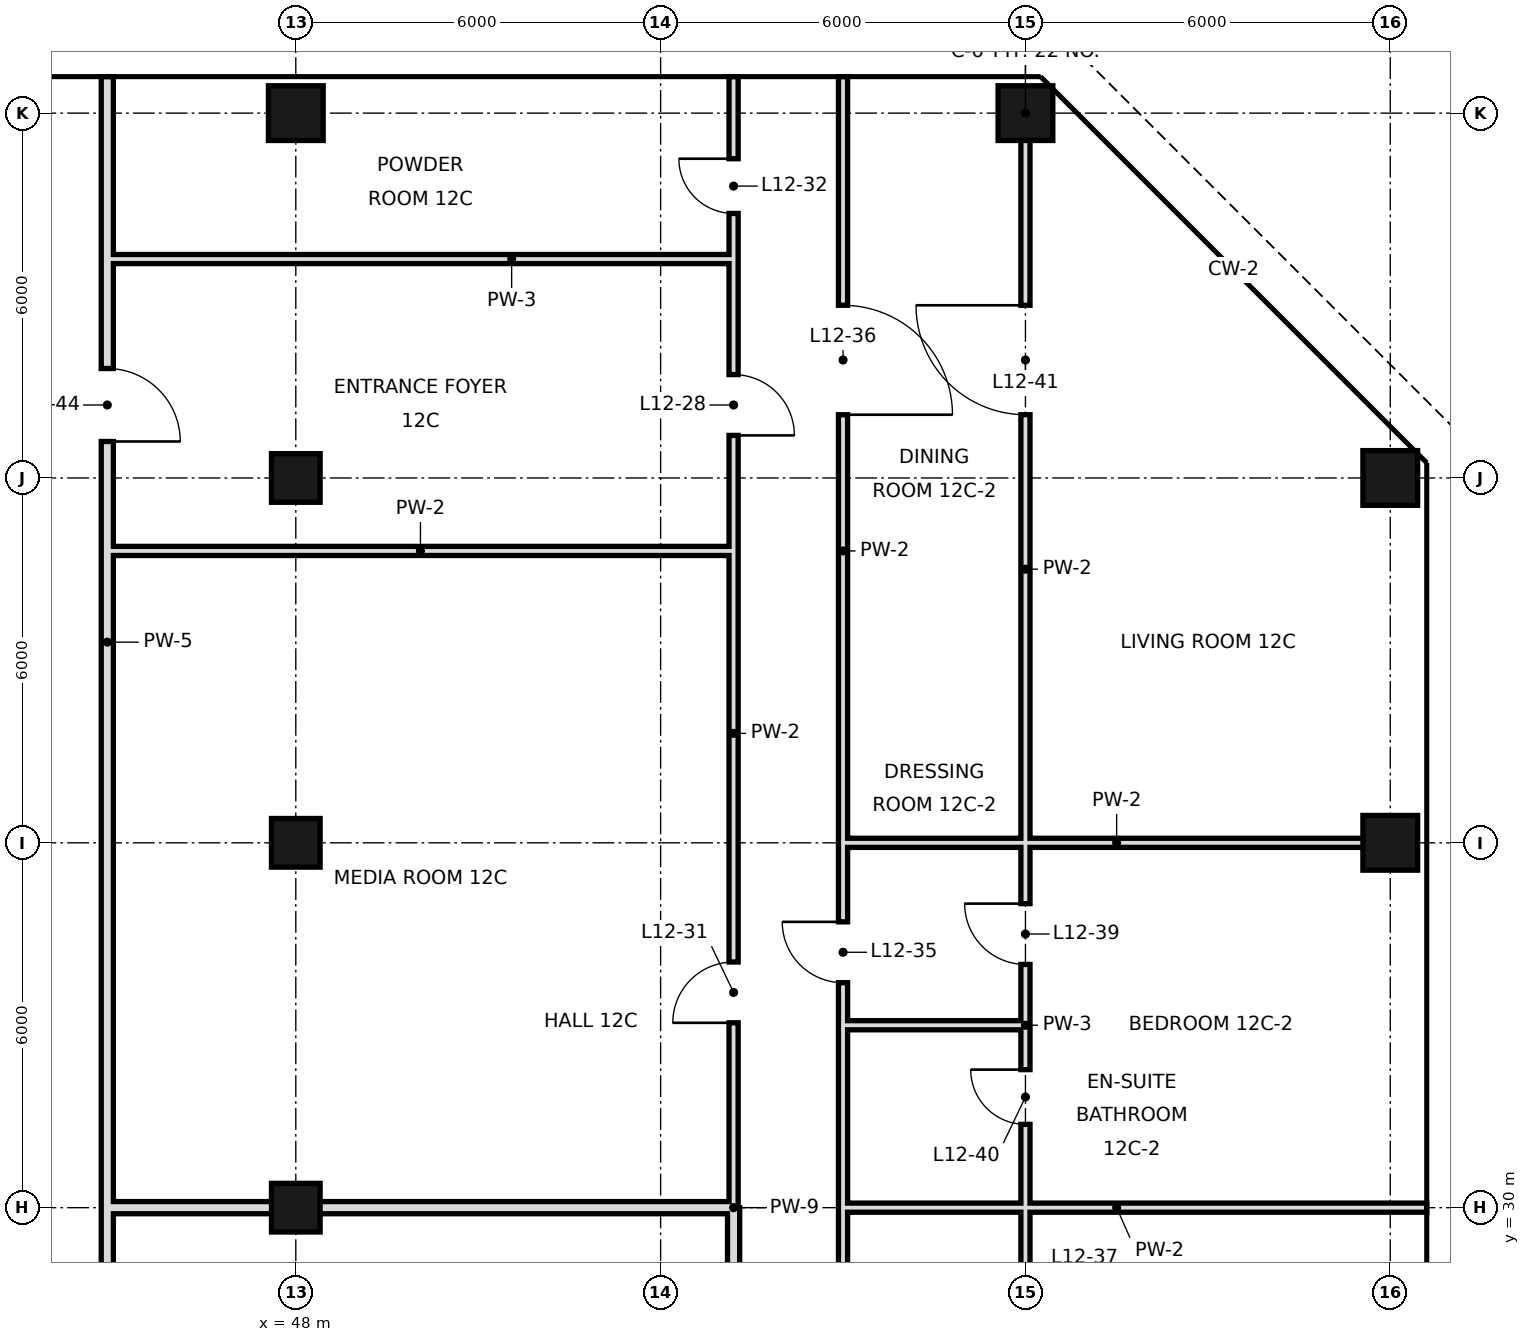
"""IFC4 building model, lengths in metres.
Left out: names, types, materials, properties, quantities, classifications, styles, units other than length and angle.
Written with IfcOpenShell. Run it as: python <this file> out.ifc"""

import sys

from ifc_helpers import new_model, si_unit, direction, frame, frame_2d, origin, origin_2d, place, context, subcontext, project, spatial, rectangle, hollow_rectangle, extrude, element, fill, save


model = new_model("IFC4")
c1 = context("Model", 3, precision=1e-05, world=origin(), true_north=direction((0.0, 1.0)))
c2 = subcontext(c1, "Body", "Model", "MODEL_VIEW")
j1 = project(units=[si_unit("LENGTHUNIT", "METRE"), si_unit("PLANEANGLEUNIT", "RADIAN")], contexts=[c1])
p1 = place(None, origin())
s1 = spatial("IfcSite", under=j1, at=p1, CompositionType="ELEMENT")
p2 = place(p1, origin())
s2 = spatial("IfcBuilding", under=s1, at=p2, CompositionType="ELEMENT")
p3 = place(p2, frame((0.0, 0.0, 64.2)))
s3 = spatial("IfcBuildingStorey", under=s2, at=p3, CompositionType="ELEMENT", Elevation=64.2)
for number, where, z_axis, x_axis in (
    (1, (48.0, 30.0, 0.0), (0.0, 0.0, 1.0), (1.0, 0.0, 0.0)),
    (2, (48.0, 36.0, 0.0), (0.0, 0.0, 1.0), (1.0, 0.0, 0.0)),
    (3, (48.0, 42.0, 0.0), (0.0, 0.0, 1.0), (1.0, 0.0, 0.0)),
):
    element("IfcColumn", number, at=place(p3, frame(where, z_axis=z_axis, x_axis=x_axis)), inside=s3, PredefinedType="COLUMN", context=c2, shape_type="SweptSolid", body=[
        extrude(hollow_rectangle(XDim=0.8, YDim=0.8, WallThickness=0.04, at=origin_2d()), origin(), (0.0, 0.0, 1.0), 3.6),
    ])
for number, where, z_axis, x_axis in (
    (4, (48.0, 48.0, 0.0), (0.0, 0.0, 1.0), (1.0, 0.0, 0.0)),
    (5, (60.0, 48.0, 0.0), (0.0, 0.0, 1.0), (1.0, 0.0, 0.0)),
    (6, (66.0, 36.0, 0.0), (0.0, 0.0, 1.0), (1.0, 0.0, 0.0)),
    (7, (66.0, 42.0, 0.0), (0.0, 0.0, 1.0), (1.0, 0.0, 0.0)),
):
    element("IfcColumn", number, at=place(p3, frame(where, z_axis=z_axis, x_axis=x_axis)), inside=s3, PredefinedType="COLUMN", context=c2, shape_type="SweptSolid", body=[
        extrude(hollow_rectangle(XDim=0.9, YDim=0.9, WallThickness=0.045, at=origin_2d()), origin(), (0.0, 0.0, 1.0), 3.6),
    ])
p4 = place(p3, frame((44.9, 30.0, 0.0), z_axis=(0.0, 0.0, 1.0), x_axis=(0.0, 1.0, 0.0)))
e8 = element("IfcWall", 8, at=p4, inside=s3, PredefinedType="SOLIDWALL", context=c2, shape_type="SweptSolid", body=[
    extrude(rectangle(XDim=18.6, YDim=0.2, at=frame_2d((9.3, 0.0))), origin(), (0.0, 0.0, 1.0), 2.72),
])
p5 = place(p4, frame((12.6, 0.0, 0.0)))
e9 = element("IfcOpeningElement", 9, at=p5, cuts=e8, PredefinedType="OPENING", context=c2, shape_type="SweptSolid", body=[
    extrude(rectangle(XDim=1.2, YDim=2.4, at=frame_2d((0.6, 1.2))), frame((0.0, 0.11, 0.0), z_axis=(0.0, -1.0, 0.0), x_axis=(1.0, 0.0, 0.0)), (0.0, 0.0, 1.0), 0.22),
])
p6 = place(p3, frame((44.9, 25.8, 0.0), z_axis=(0.0, 0.0, 1.0), x_axis=(0.0, 1.0, 0.0)))
e10 = element("IfcWall", 10, at=p6, inside=s3, PredefinedType="SOLIDWALL", context=c2, shape_type="SweptSolid", body=[
    extrude(rectangle(XDim=4.2, YDim=0.2, at=frame_2d((2.1, 0.0))), origin(), (0.0, 0.0, 1.0), 2.97),
])
p7 = place(p3, frame((55.2, 25.8, 0.0), z_axis=(0.0, 0.0, 1.0), x_axis=(0.0, 1.0, 0.0)))
e11 = element("IfcWall", 11, at=p7, inside=s3, PredefinedType="SOLIDWALL", context=c2, shape_type="SweptSolid", body=[
    extrude(rectangle(XDim=4.2, YDim=0.2, at=frame_2d((2.1, 0.0))), origin(), (0.0, 0.0, 1.0), 2.52),
])
p8 = place(p7, frame((1.6, 0.0, 0.0)))
e12 = element("IfcOpeningElement", 12, at=p8, cuts=e11, PredefinedType="OPENING", context=c2, shape_type="SweptSolid", body=[
    extrude(rectangle(XDim=1.0, YDim=2.4, at=frame_2d((0.5, 1.2))), frame((0.0, 0.11, 0.0), z_axis=(0.0, -1.0, 0.0), x_axis=(1.0, 0.0, 0.0)), (0.0, 0.0, 1.0), 0.22),
])
p9 = place(p3, frame((55.2, 30.0, 0.0), z_axis=(0.0, 0.0, 1.0), x_axis=(0.0, 1.0, 0.0)))
e13 = element("IfcWall", 13, at=p9, inside=s3, PredefinedType="PARTITIONING", context=c2, shape_type="SweptSolid", body=[
    extrude(rectangle(XDim=15.6, YDim=0.15, at=frame_2d((7.8, 0.0))), origin(), (0.0, 0.0, 1.0), 3.42),
])
p10 = place(p9, frame((12.7, 0.0, 0.0)))
e14 = element("IfcOpeningElement", 14, at=p10, cuts=e13, PredefinedType="OPENING", context=c2, shape_type="SweptSolid", body=[
    extrude(rectangle(XDim=1.0, YDim=2.4, at=frame_2d((0.5, 1.2))), frame((0.0, 0.085, 0.0), z_axis=(0.0, -1.0, 0.0), x_axis=(1.0, 0.0, 0.0)), (0.0, 0.0, 1.0), 0.17),
])
p11 = place(p9, frame((3.04, 0.0, 0.0)))
e15 = element("IfcOpeningElement", 15, at=p11, cuts=e13, PredefinedType="OPENING", context=c2, shape_type="SweptSolid", body=[
    extrude(rectangle(XDim=1.0, YDim=2.4, at=frame_2d((0.5, 1.2))), frame((0.0, 0.085, 0.0), z_axis=(0.0, -1.0, 0.0), x_axis=(1.0, 0.0, 0.0)), (0.0, 0.0, 1.0), 0.17),
])
p12 = place(p3, frame((55.2, 45.6, 0.0), z_axis=(0.0, 0.0, 1.0), x_axis=(0.0, 1.0, 0.0)))
e16 = element("IfcWall", 16, at=p12, inside=s3, PredefinedType="PARTITIONING", context=c2, shape_type="SweptSolid", body=[
    extrude(rectangle(XDim=3.0, YDim=0.15, at=frame_2d((1.5, 0.0))), origin(), (0.0, 0.0, 1.0), 3.42),
])
p13 = place(p12, frame((0.75, 0.0, 0.0)))
e17 = element("IfcOpeningElement", 17, at=p13, cuts=e16, PredefinedType="OPENING", context=c2, shape_type="SweptSolid", body=[
    extrude(rectangle(XDim=0.9, YDim=2.4, at=frame_2d((0.45, 1.2))), frame((0.0, 0.085, 0.0), z_axis=(0.0, -1.0, 0.0), x_axis=(1.0, 0.0, 0.0)), (0.0, 0.0, 1.0), 0.17),
])
p14 = place(p3, frame((57.0, 26.4, 0.0), z_axis=(0.0, 0.0, 1.0), x_axis=(0.0, 1.0, 0.0)))
e18 = element("IfcWall", 18, at=p14, inside=s3, PredefinedType="PARTITIONING", context=c2, shape_type="SweptSolid", body=[
    extrude(rectangle(XDim=3.6, YDim=0.15, at=frame_2d((1.8, 0.0))), origin(), (0.0, 0.0, 1.0), 3.42),
])
p15 = place(p14, frame((1.3, 0.0, 0.0)))
e19 = element("IfcOpeningElement", 19, at=p15, cuts=e18, PredefinedType="OPENING", context=c2, shape_type="SweptSolid", body=[
    extrude(rectangle(XDim=1.0, YDim=2.4, at=frame_2d((0.5, 1.2))), frame((0.0, 0.085, 0.0), z_axis=(0.0, -1.0, 0.0), x_axis=(1.0, 0.0, 0.0)), (0.0, 0.0, 1.0), 0.17),
])
p16 = place(p3, frame((57.0, 33.0, 0.0), z_axis=(0.0, 0.0, 1.0), x_axis=(0.0, 1.0, 0.0)))
e20 = element("IfcWall", 20, at=p16, inside=s3, PredefinedType="PARTITIONING", context=c2, shape_type="SweptSolid", body=[
    extrude(rectangle(XDim=15.6, YDim=0.15, at=frame_2d((7.8, 0.0))), origin(), (0.0, 0.0, 1.0), 3.42),
])
p17 = place(p16, frame((0.7, 0.0, 0.0)))
e21 = element("IfcOpeningElement", 21, at=p17, cuts=e20, PredefinedType="OPENING", context=c2, shape_type="SweptSolid", body=[
    extrude(rectangle(XDim=1.0, YDim=2.4, at=frame_2d((0.5, 1.2))), frame((0.0, 0.085, 0.0), z_axis=(0.0, -1.0, 0.0), x_axis=(1.0, 0.0, 0.0)), (0.0, 0.0, 1.0), 0.17),
])
p18 = place(p16, frame((10.04, 0.0, 0.0)))
e22 = element("IfcOpeningElement", 22, at=p18, cuts=e20, PredefinedType="OPENING", context=c2, shape_type="SweptSolid", body=[
    extrude(rectangle(XDim=1.8, YDim=2.4, at=frame_2d((0.9, 1.2))), frame((0.0, 0.085, 0.0), z_axis=(0.0, -1.0, 0.0), x_axis=(1.0, 0.0, 0.0)), (0.0, 0.0, 1.0), 0.17),
])
p19 = place(p3, frame((57.0, 30.0, 0.0), z_axis=(0.0, 0.0, 1.0), x_axis=(0.0, 1.0, 0.0)))
e23 = element("IfcWall", 23, at=p19, inside=s3, PredefinedType="PARTITIONING", context=c2, shape_type="SweptSolid", body=[
    extrude(rectangle(XDim=3.0, YDim=0.15, at=frame_2d((1.5, 0.0))), origin(), (0.0, 0.0, 1.0), 3.42),
])
p20 = place(p3, frame((60.0, 26.4, 0.0), z_axis=(0.0, 0.0, 1.0), x_axis=(0.0, 1.0, 0.0)))
e24 = element("IfcWall", 24, at=p20, inside=s3, PredefinedType="PARTITIONING", context=c2, shape_type="SweptSolid", body=[
    extrude(rectangle(XDim=3.6, YDim=0.15, at=frame_2d((1.8, 0.0))), origin(), (0.0, 0.0, 1.0), 3.42),
])
p21 = place(p20, frame((1.3, 0.0, 0.0)))
e25 = element("IfcOpeningElement", 25, at=p21, cuts=e24, PredefinedType="OPENING", context=c2, shape_type="SweptSolid", body=[
    extrude(rectangle(XDim=1.0, YDim=2.4, at=frame_2d((0.5, 1.2))), frame((0.0, 0.085, 0.0), z_axis=(0.0, -1.0, 0.0), x_axis=(1.0, 0.0, 0.0)), (0.0, 0.0, 1.0), 0.17),
])
p22 = place(p3, frame((60.0, 33.0, 0.0), z_axis=(0.0, 0.0, 1.0), x_axis=(0.0, 1.0, 0.0)))
e26 = element("IfcWall", 26, at=p22, inside=s3, PredefinedType="PARTITIONING", context=c2, shape_type="SweptSolid", body=[
    extrude(rectangle(XDim=15.0, YDim=0.15, at=frame_2d((7.5, 0.0))), origin(), (0.0, 0.0, 1.0), 3.42),
])
p23 = place(p22, frame((1.0, 0.0, 0.0)))
e27 = element("IfcOpeningElement", 27, at=p23, cuts=e26, PredefinedType="OPENING", context=c2, shape_type="SweptSolid", body=[
    extrude(rectangle(XDim=1.0, YDim=2.4, at=frame_2d((0.5, 1.2))), frame((0.0, 0.085, 0.0), z_axis=(0.0, -1.0, 0.0), x_axis=(1.0, 0.0, 0.0)), (0.0, 0.0, 1.0), 0.17),
])
p24 = place(p22, frame((10.04, 0.0, 0.0)))
e28 = element("IfcOpeningElement", 28, at=p24, cuts=e26, PredefinedType="OPENING", context=c2, shape_type="SweptSolid", body=[
    extrude(rectangle(XDim=1.8, YDim=2.4, at=frame_2d((0.9, 1.2))), frame((0.0, 0.085, 0.0), z_axis=(0.0, -1.0, 0.0), x_axis=(1.0, 0.0, 0.0)), (0.0, 0.0, 1.0), 0.17),
])
p25 = place(p3, frame((60.0, 30.0, 0.0), z_axis=(0.0, 0.0, 1.0), x_axis=(0.0, 1.0, 0.0)))
e29 = element("IfcWall", 29, at=p25, inside=s3, PredefinedType="PARTITIONING", context=c2, shape_type="SweptSolid", body=[
    extrude(rectangle(XDim=3.0, YDim=0.15, at=frame_2d((1.5, 0.0))), origin(), (0.0, 0.0, 1.0), 3.42),
])
p26 = place(p25, frame((1.37, 0.0, 0.0)))
e30 = element("IfcOpeningElement", 30, at=p26, cuts=e29, PredefinedType="OPENING", context=c2, shape_type="SweptSolid", body=[
    extrude(rectangle(XDim=0.9, YDim=2.4, at=frame_2d((0.45, 1.2))), frame((0.0, 0.085, 0.0), z_axis=(0.0, -1.0, 0.0), x_axis=(1.0, 0.0, 0.0)), (0.0, 0.0, 1.0), 0.17),
])
p27 = place(p3, frame((44.9, 30.0, 0.0), z_axis=(0.0, 0.0, 1.0), x_axis=(1.0, 0.0, 0.0)))
e31 = element("IfcWall", 31, at=p27, inside=s3, PredefinedType="SOLIDWALL", context=c2, shape_type="SweptSolid", body=[
    extrude(rectangle(XDim=10.3, YDim=0.2, at=frame_2d((5.15, 0.0))), origin(), (0.0, 0.0, 1.0), 2.52),
])
p28 = place(p3, frame((60.0, 30.0, 0.0), z_axis=(0.0, 0.0, 1.0), x_axis=(1.0, 0.0, 0.0)))
e32 = element("IfcWall", 32, at=p28, inside=s3, PredefinedType="PARTITIONING", context=c2, shape_type="SweptSolid", body=[
    extrude(rectangle(XDim=6.6, YDim=0.15, at=frame_2d((3.3, 0.0))), origin(), (0.0, 0.0, 1.0), 2.52),
])
p29 = place(p3, frame((57.0, 30.0, 0.0), z_axis=(0.0, 0.0, 1.0), x_axis=(1.0, 0.0, 0.0)))
e33 = element("IfcWall", 33, at=p29, inside=s3, PredefinedType="PARTITIONING", context=c2, shape_type="SweptSolid", body=[
    extrude(rectangle(XDim=3.0, YDim=0.15, at=frame_2d((1.5, 0.0))), origin(), (0.0, 0.0, 1.0), 2.52),
])
p30 = place(p3, frame((57.0, 33.0, 0.0), z_axis=(0.0, 0.0, 1.0), x_axis=(1.0, 0.0, 0.0)))
e34 = element("IfcWall", 34, at=p30, inside=s3, PredefinedType="PARTITIONING", context=c2, shape_type="SweptSolid", body=[
    extrude(rectangle(XDim=3.0, YDim=0.15, at=frame_2d((1.5, 0.0))), origin(), (0.0, 0.0, 1.0), 3.42),
])
p31 = place(p3, frame((57.0, 36.0, 0.0), z_axis=(0.0, 0.0, 1.0), x_axis=(1.0, 0.0, 0.0)))
e35 = element("IfcWall", 35, at=p31, inside=s3, PredefinedType="PARTITIONING", context=c2, shape_type="SweptSolid", body=[
    extrude(rectangle(XDim=9.0, YDim=0.15, at=frame_2d((4.5, 0.0))), origin(), (0.0, 0.0, 1.0), 2.52),
])
for number, where, z_axis, x_axis in (
    (36, (44.9, 40.8, 0.0), (0.0, 0.0, 1.0), (1.0, 0.0, 0.0)),
    (37, (44.9, 45.6, 0.0), (0.0, 0.0, 1.0), (1.0, 0.0, 0.0)),
):
    element("IfcWall", number, at=place(p3, frame(where, z_axis=z_axis, x_axis=x_axis)), inside=s3, PredefinedType="PARTITIONING", context=c2, shape_type="SweptSolid", body=[
        extrude(rectangle(XDim=10.3, YDim=0.15, at=frame_2d((5.15, 0.0))), origin(), (0.0, 0.0, 1.0), 3.42),
    ])
p32 = place(p10, frame((1.0, 0.0, 0.0), z_axis=(0.0, 0.0, 1.0), x_axis=(-1.0, 0.0, 0.0)))
e38 = element("IfcDoor", 38, at=p32, inside=s3, OperationType="SINGLE_SWING_RIGHT", PredefinedType="DOOR", context=c2, shape_type="SweptSolid", body=[
    extrude(rectangle(XDim=1.0, YDim=2.4, at=frame_2d((0.5, 1.2))), frame((0.0, 0.025, 0.0), z_axis=(0.0, -1.0, 0.0), x_axis=(1.0, 0.0, 0.0)), (0.0, 0.0, 1.0), 0.05),
])
fill(e14, e38)
p33 = place(p11, origin())
e39 = element("IfcDoor", 39, at=p33, inside=s3, OperationType="SINGLE_SWING_LEFT", PredefinedType="DOOR", context=c2, shape_type="SweptSolid", body=[
    extrude(rectangle(XDim=1.0, YDim=2.4, at=frame_2d((0.5, 1.2))), frame((0.0, 0.025, 0.0), z_axis=(0.0, -1.0, 0.0), x_axis=(1.0, 0.0, 0.0)), (0.0, 0.0, 1.0), 0.05),
])
fill(e15, e39)
p34 = place(p13, frame((0.9, 0.0, 0.0), z_axis=(0.0, 0.0, 1.0), x_axis=(-1.0, 0.0, 0.0)))
e40 = element("IfcDoor", 40, at=p34, inside=s3, OperationType="SINGLE_SWING_LEFT", PredefinedType="DOOR", context=c2, shape_type="SweptSolid", body=[
    extrude(rectangle(XDim=0.9, YDim=2.4, at=frame_2d((0.45, 1.2))), frame((0.0, 0.025, 0.0), z_axis=(0.0, -1.0, 0.0), x_axis=(1.0, 0.0, 0.0)), (0.0, 0.0, 1.0), 0.05),
])
fill(e17, e40)
p35 = place(p17, frame((1.0, 0.0, 0.0), z_axis=(0.0, 0.0, 1.0), x_axis=(-1.0, 0.0, 0.0)))
e41 = element("IfcDoor", 41, at=p35, inside=s3, OperationType="SINGLE_SWING_LEFT", PredefinedType="DOOR", context=c2, shape_type="SweptSolid", body=[
    extrude(rectangle(XDim=1.0, YDim=2.4, at=frame_2d((0.5, 1.2))), frame((0.0, 0.025, 0.0), z_axis=(0.0, -1.0, 0.0), x_axis=(1.0, 0.0, 0.0)), (0.0, 0.0, 1.0), 0.05),
])
fill(e21, e41)
p36 = place(p18, frame((1.8, 0.0, 0.0), z_axis=(0.0, 0.0, 1.0), x_axis=(-1.0, 0.0, 0.0)))
e42 = element("IfcDoor", 42, at=p36, inside=s3, OperationType="SINGLE_SWING_RIGHT", PredefinedType="DOOR", context=c2, shape_type="SweptSolid", body=[
    extrude(rectangle(XDim=1.8, YDim=2.4, at=frame_2d((0.9, 1.2))), frame((0.0, 0.025, 0.0), z_axis=(0.0, -1.0, 0.0), x_axis=(1.0, 0.0, 0.0)), (0.0, 0.0, 1.0), 0.05),
])
fill(e22, e42)
p37 = place(p23, frame((1.0, 0.0, 0.0), z_axis=(0.0, 0.0, 1.0), x_axis=(-1.0, 0.0, 0.0)))
e43 = element("IfcDoor", 43, at=p37, inside=s3, OperationType="SINGLE_SWING_LEFT", PredefinedType="DOOR", context=c2, shape_type="SweptSolid", body=[
    extrude(rectangle(XDim=1.0, YDim=2.4, at=frame_2d((0.5, 1.2))), frame((0.0, 0.025, 0.0), z_axis=(0.0, -1.0, 0.0), x_axis=(1.0, 0.0, 0.0)), (0.0, 0.0, 1.0), 0.05),
])
fill(e27, e43)
p38 = place(p26, frame((0.9, 0.0, 0.0), z_axis=(0.0, 0.0, 1.0), x_axis=(-1.0, 0.0, 0.0)))
e44 = element("IfcDoor", 44, at=p38, inside=s3, OperationType="SINGLE_SWING_LEFT", PredefinedType="DOOR", context=c2, shape_type="SweptSolid", body=[
    extrude(rectangle(XDim=0.9, YDim=2.4, at=frame_2d((0.45, 1.2))), frame((0.0, 0.025, 0.0), z_axis=(0.0, -1.0, 0.0), x_axis=(1.0, 0.0, 0.0)), (0.0, 0.0, 1.0), 0.05),
])
fill(e30, e44)
p39 = place(p24, frame((1.8, 0.0, 0.0), z_axis=(0.0, 0.0, 1.0), x_axis=(-1.0, 0.0, 0.0)))
e45 = element("IfcDoor", 45, at=p39, inside=s3, OperationType="SINGLE_SWING_LEFT", PredefinedType="DOOR", context=c2, shape_type="SweptSolid", body=[
    extrude(rectangle(XDim=1.8, YDim=2.4, at=frame_2d((0.9, 1.2))), frame((0.0, 0.025, 0.0), z_axis=(0.0, -1.0, 0.0), x_axis=(1.0, 0.0, 0.0)), (0.0, 0.0, 1.0), 0.05),
])
fill(e28, e45)
p40 = place(p5, frame((1.2, 0.0, 0.0), z_axis=(0.0, 0.0, 1.0), x_axis=(-1.0, 0.0, 0.0)))
e46 = element("IfcDoor", 46, at=p40, inside=s3, OperationType="SINGLE_SWING_RIGHT", PredefinedType="DOOR", context=c2, shape_type="SweptSolid", body=[
    extrude(rectangle(XDim=1.2, YDim=2.4, at=frame_2d((0.6, 1.2))), frame((0.0, 0.025, 0.0), z_axis=(0.0, -1.0, 0.0), x_axis=(1.0, 0.0, 0.0)), (0.0, 0.0, 1.0), 0.05),
])
fill(e9, e46)
save(model, sys.argv[1])
